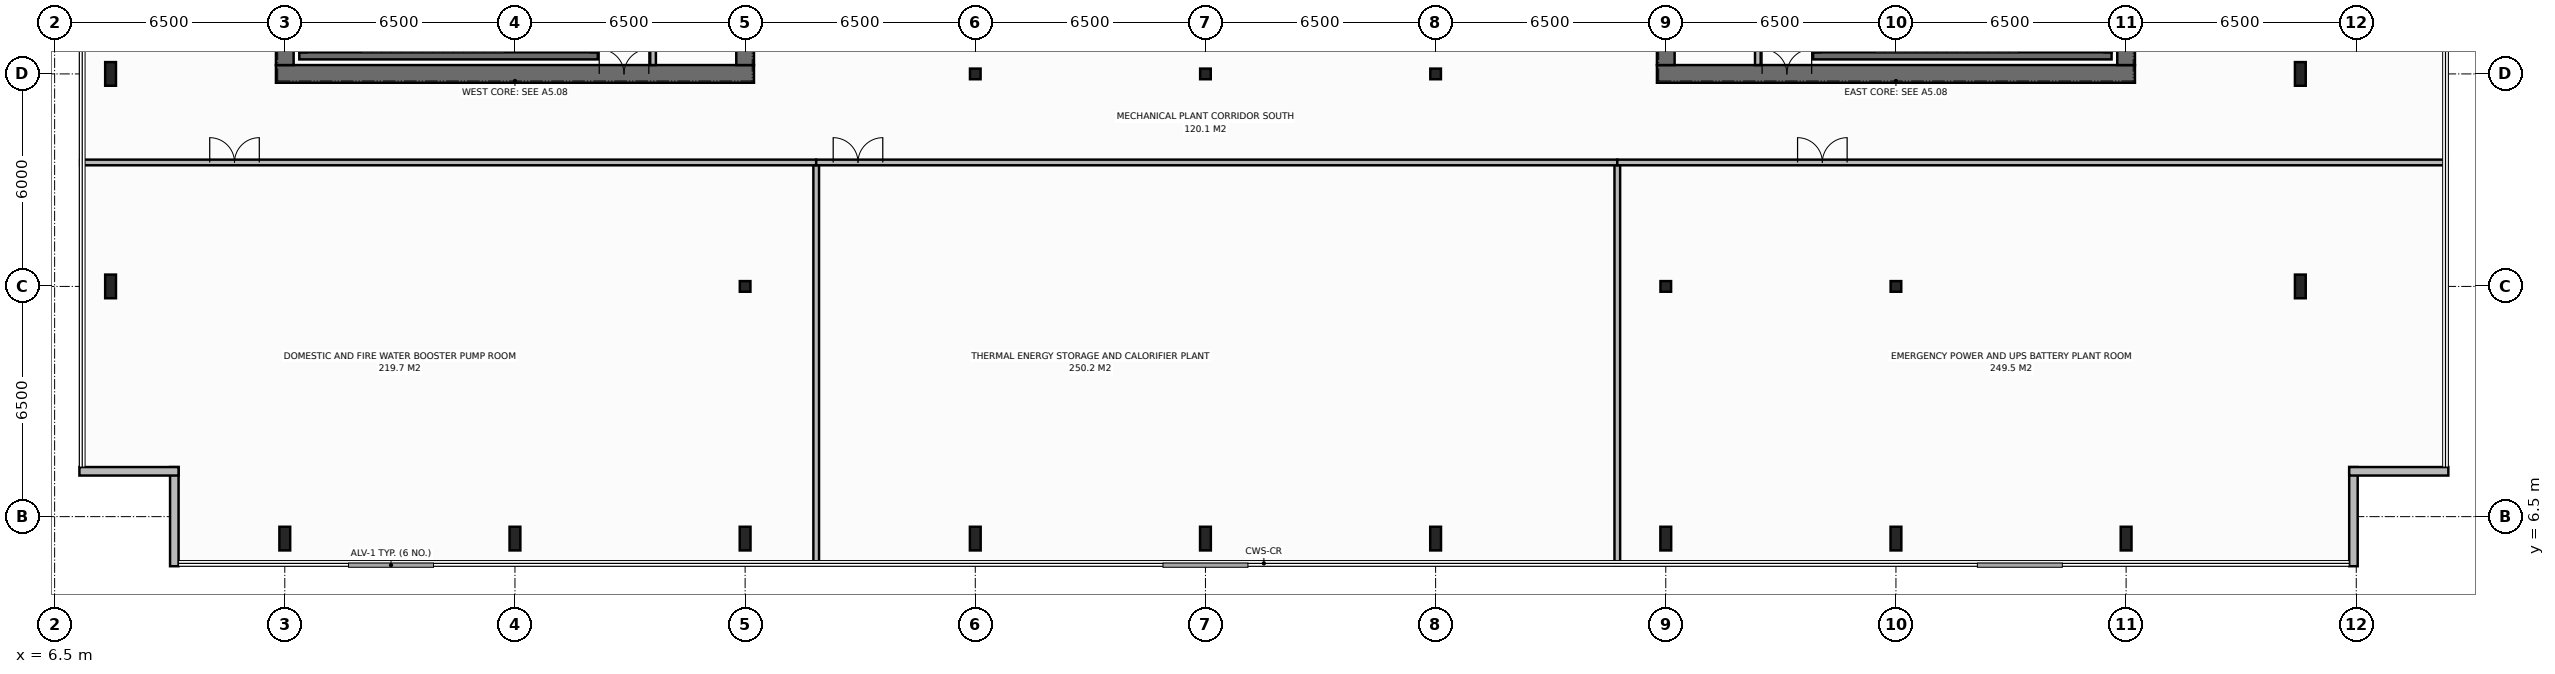
"""IFC4 building model, lengths in metres.
Left out: names, types, materials, properties, quantities, classifications, styles, units other than length and angle.
Written with IfcOpenShell. Run it as: python <this file> out.ifc"""

import sys

from ifc_helpers import new_model, si_unit, direction, frame, frame_2d, origin, origin_2d, place, context, subcontext, project, spatial, rectangle, i_section, extrude, element, fill, save


model = new_model("IFC4")
c1 = context("Model", 3, precision=1e-05, world=origin(), true_north=direction((0.0, 1.0)))
c2 = subcontext(c1, "Body", "Model", "MODEL_VIEW")
j1 = project(units=[si_unit("LENGTHUNIT", "METRE"), si_unit("PLANEANGLEUNIT", "RADIAN")], contexts=[c1])
p1 = place(None, origin())
s1 = spatial("IfcSite", under=j1, at=p1, CompositionType="ELEMENT")
p2 = place(p1, origin())
s2 = spatial("IfcBuilding", under=s1, at=p2, CompositionType="ELEMENT")
p3 = place(p2, frame((0.0, 0.0, 310.4)))
s3 = spatial("IfcBuildingStorey", under=s2, at=p3, CompositionType="ELEMENT", Elevation=310.4)
p4 = place(p3, frame((12.75, 19.0, 0.0), z_axis=(0.0, 0.0, 1.0), x_axis=(1.0, 0.0, 0.0)))
e1 = element("IfcWall", 1, at=p4, inside=s3, PredefinedType="SHEAR", context=c2, shape_type="SweptSolid", body=[
    extrude(rectangle(XDim=13.5, YDim=0.5, at=frame_2d((6.75, 0.0))), origin(), (0.0, 0.0, 1.0), 5.0),
])
p5 = place(p4, frame((9.13, 0.0, 0.0)))
e2 = element("IfcOpeningElement", 2, at=p5, cuts=e1, PredefinedType="OPENING", context=c2, shape_type="SweptSolid", body=[
    extrude(rectangle(XDim=1.4, YDim=2.2, at=frame_2d((0.7, 1.1))), frame((0.0, 0.26, 0.0), z_axis=(0.0, -1.0, 0.0), x_axis=(1.0, 0.0, 0.0)), (0.0, 0.0, 1.0), 0.52),
])
p6 = place(p3, frame((13.0, 19.25, 0.0), z_axis=(0.0, 0.0, 1.0), x_axis=(0.0, 1.0, 0.0)))
e3 = element("IfcWall", 3, at=p6, inside=s3, PredefinedType="SHEAR", context=c2, shape_type="SweptSolid", body=[
    extrude(rectangle(XDim=13.5, YDim=0.5, at=frame_2d((6.75, 0.0))), origin(), (0.0, 0.0, 1.0), 5.0),
])
p7 = place(p6, frame((4.8, 0.0, 0.0)))
e4 = element("IfcOpeningElement", 4, at=p7, cuts=e3, PredefinedType="OPENING", context=c2, shape_type="SweptSolid", body=[
    extrude(rectangle(XDim=1.4, YDim=2.2, at=frame_2d((0.7, 1.1))), frame((0.0, 0.26, 0.0), z_axis=(0.0, -1.0, 0.0), x_axis=(1.0, 0.0, 0.0)), (0.0, 0.0, 1.0), 0.52),
])
p8 = place(p3, frame((26.0, 19.25, 0.0), z_axis=(0.0, 0.0, 1.0), x_axis=(0.0, 1.0, 0.0)))
e5 = element("IfcWall", 5, at=p8, inside=s3, PredefinedType="SHEAR", context=c2, shape_type="SweptSolid", body=[
    extrude(rectangle(XDim=13.5, YDim=0.5, at=frame_2d((6.75, 0.0))), origin(), (0.0, 0.0, 1.0), 5.0),
])
p9 = place(p3, frame((51.75, 19.0, 0.0), z_axis=(0.0, 0.0, 1.0), x_axis=(1.0, 0.0, 0.0)))
e6 = element("IfcWall", 6, at=p9, inside=s3, PredefinedType="SHEAR", context=c2, shape_type="SweptSolid", body=[
    extrude(rectangle(XDim=13.5, YDim=0.5, at=frame_2d((6.75, 0.0))), origin(), (0.0, 0.0, 1.0), 5.0),
])
p10 = place(p9, frame((2.97, 0.0, 0.0)))
e7 = element("IfcOpeningElement", 7, at=p10, cuts=e6, PredefinedType="OPENING", context=c2, shape_type="SweptSolid", body=[
    extrude(rectangle(XDim=1.4, YDim=2.2, at=frame_2d((0.7, 1.1))), frame((0.0, 0.26, 0.0), z_axis=(0.0, -1.0, 0.0), x_axis=(1.0, 0.0, 0.0)), (0.0, 0.0, 1.0), 0.52),
])
p11 = place(p3, frame((52.0, 19.25, 0.0), z_axis=(0.0, 0.0, 1.0), x_axis=(0.0, 1.0, 0.0)))
e8 = element("IfcWall", 8, at=p11, inside=s3, PredefinedType="SHEAR", context=c2, shape_type="SweptSolid", body=[
    extrude(rectangle(XDim=13.5, YDim=0.5, at=frame_2d((6.75, 0.0))), origin(), (0.0, 0.0, 1.0), 5.0),
])
p12 = place(p3, frame((65.0, 19.25, 0.0), z_axis=(0.0, 0.0, 1.0), x_axis=(0.0, 1.0, 0.0)))
e9 = element("IfcWall", 9, at=p12, inside=s3, PredefinedType="SHEAR", context=c2, shape_type="SweptSolid", body=[
    extrude(rectangle(XDim=13.5, YDim=0.5, at=frame_2d((6.75, 0.0))), origin(), (0.0, 0.0, 1.0), 5.0),
])
p13 = place(p12, frame((8.2, 0.0, 0.0)))
e10 = element("IfcOpeningElement", 10, at=p13, cuts=e9, PredefinedType="OPENING", context=c2, shape_type="SweptSolid", body=[
    extrude(rectangle(XDim=1.3, YDim=2.2, at=frame_2d((0.65, 1.1))), frame((0.0, 0.26, 0.0), z_axis=(0.0, -1.0, 0.0), x_axis=(1.0, 0.0, 0.0)), (0.0, 0.0, 1.0), 0.52),
])
for number, where, z_axis, x_axis in (
    (11, (13.41, 19.51, 0.0), (0.0, 0.0, 1.0), (1.0, 0.0, 0.0)),
    (12, (56.16, 19.51, 0.0), (0.0, 0.0, 1.0), (1.0, 0.0, 0.0)),
):
    element("IfcWall", number, at=place(p3, frame(where, z_axis=z_axis, x_axis=x_axis)), inside=s3, PredefinedType="SHEAR", context=c2, shape_type="SweptSolid", body=[
        extrude(rectangle(XDim=8.43, YDim=0.2, at=frame_2d((4.215, 0.0))), origin(), (0.0, 0.0, 1.0), 5.0),
    ])
for number, where, z_axis, x_axis in (
    (13, (58.5, 13.0, 0.0), (0.0, 0.0, 1.0), (1.0, 0.0, 0.0)),
    (14, (32.5, 19.0, 0.0), (0.0, 0.0, 1.0), (1.0, 0.0, 0.0)),
    (15, (39.0, 19.0, 0.0), (0.0, 0.0, 1.0), (1.0, 0.0, 0.0)),
    (16, (45.5, 19.0, 0.0), (0.0, 0.0, 1.0), (1.0, 0.0, 0.0)),
    (17, (26.0, 13.0, 0.0), (0.0, 0.0, 1.0), (1.0, 0.0, 0.0)),
    (18, (52.0, 13.0, 0.0), (0.0, 0.0, 1.0), (1.0, 0.0, 0.0)),
):
    element("IfcColumn", number, at=place(p3, frame(where, z_axis=z_axis, x_axis=x_axis)), inside=s3, PredefinedType="COLUMN", context=c2, shape_type="SweptSolid", body=[
        extrude(i_section(OverallWidth=0.3, OverallDepth=0.3, WebThickness=0.011, FlangeThickness=0.019, at=origin_2d()), origin(), (0.0, 0.0, 1.0), 5.0),
    ])
for number, where, z_axis, x_axis in (
    (19, (13.0, 5.88, 0.0), (0.0, 0.0, 1.0), (1.0, 0.0, 0.0)),
    (20, (19.5, 5.88, 0.0), (0.0, 0.0, 1.0), (1.0, 0.0, 0.0)),
    (21, (26.0, 5.88, 0.0), (0.0, 0.0, 1.0), (1.0, 0.0, 0.0)),
    (22, (32.5, 5.88, 0.0), (0.0, 0.0, 1.0), (1.0, 0.0, 0.0)),
    (23, (39.0, 5.88, 0.0), (0.0, 0.0, 1.0), (1.0, 0.0, 0.0)),
    (24, (45.5, 5.88, 0.0), (0.0, 0.0, 1.0), (1.0, 0.0, 0.0)),
    (25, (52.0, 5.88, 0.0), (0.0, 0.0, 1.0), (1.0, 0.0, 0.0)),
    (26, (58.5, 5.88, 0.0), (0.0, 0.0, 1.0), (1.0, 0.0, 0.0)),
    (27, (65.0, 5.88, 0.0), (0.0, 0.0, 1.0), (1.0, 0.0, 0.0)),
    (28, (8.08, 13.0, 0.0), (0.0, 0.0, 1.0), (1.0, 0.0, 0.0)),
    (29, (69.92, 13.0, 0.0), (0.0, 0.0, 1.0), (1.0, 0.0, 0.0)),
    (30, (8.08, 19.0, 0.0), (0.0, 0.0, 1.0), (1.0, 0.0, 0.0)),
    (31, (69.92, 19.0, 0.0), (0.0, 0.0, 1.0), (1.0, 0.0, 0.0)),
):
    element("IfcColumn", number, at=place(p3, frame(where, z_axis=z_axis, x_axis=x_axis)), inside=s3, PredefinedType="COLUMN", context=c2, shape_type="SweptSolid", body=[
        extrude(i_section(OverallWidth=0.305, OverallDepth=0.668, WebThickness=0.021, FlangeThickness=0.04, at=origin_2d()), origin(), (0.0, 0.0, 1.0), 5.0),
    ])
p14 = place(p3, frame((9.88, 5.1, 0.0), z_axis=(0.0, 0.0, 1.0), x_axis=(0.0, 1.0, 0.0)))
e32 = element("IfcWall", 32, at=p14, inside=s3, PredefinedType="STANDARD", context=c2, shape_type="SweptSolid", body=[
    extrude(rectangle(XDim=2.8, YDim=0.24, at=frame_2d((1.4, 0.0))), origin(), (0.0, 0.0, 1.0), 4.72),
])
p15 = place(p3, frame((10.0, 7.78, 0.0), z_axis=(0.0, 0.0, 1.0), x_axis=(-1.0, 0.0, 0.0)))
e33 = element("IfcWall", 33, at=p15, inside=s3, PredefinedType="STANDARD", context=c2, shape_type="SweptSolid", body=[
    extrude(rectangle(XDim=2.8, YDim=0.24, at=frame_2d((1.4, 0.0))), origin(), (0.0, 0.0, 1.0), 4.72),
])
p16 = place(p3, frame((71.42, 7.9, 0.0), z_axis=(0.0, 0.0, 1.0), x_axis=(0.0, -1.0, 0.0)))
e34 = element("IfcWall", 34, at=p16, inside=s3, PredefinedType="STANDARD", context=c2, shape_type="SweptSolid", body=[
    extrude(rectangle(XDim=2.8, YDim=0.24, at=frame_2d((1.4, 0.0))), origin(), (0.0, 0.0, 1.0), 4.72),
])
p17 = place(p3, frame((74.1, 7.78, 0.0), z_axis=(0.0, 0.0, 1.0), x_axis=(-1.0, 0.0, 0.0)))
e35 = element("IfcWall", 35, at=p17, inside=s3, PredefinedType="STANDARD", context=c2, shape_type="SweptSolid", body=[
    extrude(rectangle(XDim=2.8, YDim=0.24, at=frame_2d((1.4, 0.0))), origin(), (0.0, 0.0, 1.0), 4.72),
])
p18 = place(p3, frame((23.4, 19.25, 0.0), z_axis=(0.0, 0.0, 1.0), x_axis=(0.0, 1.0, 0.0)))
e36 = element("IfcWall", 36, at=p18, inside=s3, PredefinedType="STANDARD", context=c2, shape_type="SweptSolid", body=[
    extrude(rectangle(XDim=13.5, YDim=0.16, at=frame_2d((6.75, 0.0))), origin(), (0.0, 0.0, 1.0), 4.72),
])
p19 = place(p18, frame((2.25, 0.0, 0.0)))
e37 = element("IfcOpeningElement", 37, at=p19, cuts=e36, PredefinedType="OPENING", context=c2, shape_type="SweptSolid", body=[
    extrude(rectangle(XDim=0.95, YDim=2.15, at=frame_2d((0.475, 1.075))), frame((0.0, 0.09, 0.0), z_axis=(0.0, -1.0, 0.0), x_axis=(1.0, 0.0, 0.0)), (0.0, 0.0, 1.0), 0.18),
])
p20 = place(p18, frame((6.35, 0.0, 0.0)))
e38 = element("IfcOpeningElement", 38, at=p20, cuts=e36, PredefinedType="OPENING", context=c2, shape_type="SweptSolid", body=[
    extrude(rectangle(XDim=0.95, YDim=2.15, at=frame_2d((0.475, 1.075))), frame((0.0, 0.09, 0.0), z_axis=(0.0, -1.0, 0.0), x_axis=(1.0, 0.0, 0.0)), (0.0, 0.0, 1.0), 0.18),
])
p21 = place(p18, frame((9.95, 0.0, 0.0)))
e39 = element("IfcOpeningElement", 39, at=p21, cuts=e36, PredefinedType="OPENING", context=c2, shape_type="SweptSolid", body=[
    extrude(rectangle(XDim=0.95, YDim=2.15, at=frame_2d((0.475, 1.075))), frame((0.0, 0.09, 0.0), z_axis=(0.0, -1.0, 0.0), x_axis=(1.0, 0.0, 0.0)), (0.0, 0.0, 1.0), 0.18),
])
p22 = place(p3, frame((54.6, 19.25, 0.0), z_axis=(0.0, 0.0, 1.0), x_axis=(0.0, 1.0, 0.0)))
e40 = element("IfcWall", 40, at=p22, inside=s3, PredefinedType="STANDARD", context=c2, shape_type="SweptSolid", body=[
    extrude(rectangle(XDim=13.5, YDim=0.16, at=frame_2d((6.75, 0.0))), origin(), (0.0, 0.0, 1.0), 4.72),
])
p23 = place(p22, frame((2.15, 0.0, 0.0)))
e41 = element("IfcOpeningElement", 41, at=p23, cuts=e40, PredefinedType="OPENING", context=c2, shape_type="SweptSolid", body=[
    extrude(rectangle(XDim=0.95, YDim=2.15, at=frame_2d((0.475, 1.075))), frame((0.0, 0.09, 0.0), z_axis=(0.0, -1.0, 0.0), x_axis=(1.0, 0.0, 0.0)), (0.0, 0.0, 1.0), 0.18),
])
p24 = place(p22, frame((6.25, 0.0, 0.0)))
e42 = element("IfcOpeningElement", 42, at=p24, cuts=e40, PredefinedType="OPENING", context=c2, shape_type="SweptSolid", body=[
    extrude(rectangle(XDim=0.95, YDim=2.15, at=frame_2d((0.475, 1.075))), frame((0.0, 0.09, 0.0), z_axis=(0.0, -1.0, 0.0), x_axis=(1.0, 0.0, 0.0)), (0.0, 0.0, 1.0), 0.18),
])
p25 = place(p22, frame((9.95, 0.0, 0.0)))
e43 = element("IfcOpeningElement", 43, at=p25, cuts=e40, PredefinedType="OPENING", context=c2, shape_type="SweptSolid", body=[
    extrude(rectangle(XDim=0.95, YDim=2.15, at=frame_2d((0.475, 1.075))), frame((0.0, 0.09, 0.0), z_axis=(0.0, -1.0, 0.0), x_axis=(1.0, 0.0, 0.0)), (0.0, 0.0, 1.0), 0.18),
])
p26 = place(p3, frame((28.007, 5.12, 0.0), z_axis=(0.0, 0.0, 1.0), x_axis=(0.0, 1.0, 0.0)))
e44 = element("IfcWall", 44, at=p26, inside=s3, PredefinedType="STANDARD", context=c2, shape_type="SweptSolid", body=[
    extrude(rectangle(XDim=11.38, YDim=0.16, at=frame_2d((5.69, 0.0))), origin(), (0.0, 0.0, 1.0), 4.72),
])
p27 = place(p3, frame((7.22, 16.5, 0.0), z_axis=(0.0, 0.0, 1.0), x_axis=(1.0, 0.0, 0.0)))
e45 = element("IfcWall", 45, at=p27, inside=s3, PredefinedType="STANDARD", context=c2, shape_type="SweptSolid", body=[
    extrude(rectangle(XDim=20.787, YDim=0.16, at=frame_2d((10.394, 0.0))), origin(), (0.0, 0.0, 1.0), 4.72),
])
p28 = place(p27, frame((3.66, 0.0, 0.0)))
e46 = element("IfcOpeningElement", 46, at=p28, cuts=e45, PredefinedType="OPENING", context=c2, shape_type="SweptSolid", body=[
    extrude(rectangle(XDim=1.4, YDim=2.2, at=frame_2d((0.7, 1.1))), frame((0.0, 0.09, 0.0), z_axis=(0.0, -1.0, 0.0), x_axis=(1.0, 0.0, 0.0)), (0.0, 0.0, 1.0), 0.18),
])
p29 = place(p3, frame((50.631, 5.12, 0.0), z_axis=(0.0, 0.0, 1.0), x_axis=(0.0, 1.0, 0.0)))
e47 = element("IfcWall", 47, at=p29, inside=s3, PredefinedType="STANDARD", context=c2, shape_type="SweptSolid", body=[
    extrude(rectangle(XDim=11.38, YDim=0.16, at=frame_2d((5.69, 0.0))), origin(), (0.0, 0.0, 1.0), 4.72),
])
p30 = place(p3, frame((28.007, 16.5, 0.0), z_axis=(0.0, 0.0, 1.0), x_axis=(1.0, 0.0, 0.0)))
e48 = element("IfcWall", 48, at=p30, inside=s3, PredefinedType="STANDARD", context=c2, shape_type="SweptSolid", body=[
    extrude(rectangle(XDim=22.624, YDim=0.16, at=frame_2d((11.312, 0.0))), origin(), (0.0, 0.0, 1.0), 4.72),
])
p31 = place(p30, frame((0.48, 0.0, 0.0)))
e49 = element("IfcOpeningElement", 49, at=p31, cuts=e48, PredefinedType="OPENING", context=c2, shape_type="SweptSolid", body=[
    extrude(rectangle(XDim=1.4, YDim=2.2, at=frame_2d((0.7, 1.1))), frame((0.0, 0.09, 0.0), z_axis=(0.0, -1.0, 0.0), x_axis=(1.0, 0.0, 0.0)), (0.0, 0.0, 1.0), 0.18),
])
p32 = place(p3, frame((50.631, 16.5, 0.0), z_axis=(0.0, 0.0, 1.0), x_axis=(1.0, 0.0, 0.0)))
e50 = element("IfcWall", 50, at=p32, inside=s3, PredefinedType="STANDARD", context=c2, shape_type="SweptSolid", body=[
    extrude(rectangle(XDim=23.449, YDim=0.16, at=frame_2d((11.725, 0.0))), origin(), (0.0, 0.0, 1.0), 4.72),
])
p33 = place(p32, frame((5.091, 0.0, 0.0)))
e51 = element("IfcOpeningElement", 51, at=p33, cuts=e50, PredefinedType="OPENING", context=c2, shape_type="SweptSolid", body=[
    extrude(rectangle(XDim=1.4, YDim=2.2, at=frame_2d((0.7, 1.1))), frame((0.0, 0.09, 0.0), z_axis=(0.0, -1.0, 0.0), x_axis=(1.0, 0.0, 0.0)), (0.0, 0.0, 1.0), 0.18),
])
p34 = place(p5, origin())
e52 = element("IfcDoor", 52, at=p34, inside=s3, OperationType="DOUBLE_DOOR_SINGLE_SWING", PredefinedType="DOOR", context=c2, shape_type="SweptSolid", body=[
    extrude(rectangle(XDim=1.4, YDim=2.2, at=frame_2d((0.7, 1.1))), frame((0.0, 0.075, 0.0), z_axis=(0.0, -1.0, 0.0), x_axis=(1.0, 0.0, 0.0)), (0.0, 0.0, 1.0), 0.05),
])
fill(e2, e52)
p35 = place(p10, origin())
e53 = element("IfcDoor", 53, at=p35, inside=s3, OperationType="DOUBLE_DOOR_SINGLE_SWING", PredefinedType="DOOR", context=c2, shape_type="SweptSolid", body=[
    extrude(rectangle(XDim=1.4, YDim=2.2, at=frame_2d((0.7, 1.1))), frame((0.0, 0.075, 0.0), z_axis=(0.0, -1.0, 0.0), x_axis=(1.0, 0.0, 0.0)), (0.0, 0.0, 1.0), 0.05),
])
fill(e7, e53)
p36 = place(p28, origin())
e54 = element("IfcDoor", 54, at=p36, inside=s3, OperationType="DOUBLE_DOOR_SINGLE_SWING", PredefinedType="DOOR", context=c2, shape_type="SweptSolid", body=[
    extrude(rectangle(XDim=1.4, YDim=2.2, at=frame_2d((0.7, 1.1))), frame((0.0, 0.025, 0.0), z_axis=(0.0, -1.0, 0.0), x_axis=(1.0, 0.0, 0.0)), (0.0, 0.0, 1.0), 0.05),
])
fill(e46, e54)
p37 = place(p31, origin())
e55 = element("IfcDoor", 55, at=p37, inside=s3, OperationType="DOUBLE_DOOR_SINGLE_SWING", PredefinedType="DOOR", context=c2, shape_type="SweptSolid", body=[
    extrude(rectangle(XDim=1.4, YDim=2.2, at=frame_2d((0.7, 1.1))), frame((0.0, 0.025, 0.0), z_axis=(0.0, -1.0, 0.0), x_axis=(1.0, 0.0, 0.0)), (0.0, 0.0, 1.0), 0.05),
])
fill(e49, e55)
p38 = place(p33, origin())
e56 = element("IfcDoor", 56, at=p38, inside=s3, OperationType="DOUBLE_DOOR_SINGLE_SWING", PredefinedType="DOOR", context=c2, shape_type="SweptSolid", body=[
    extrude(rectangle(XDim=1.4, YDim=2.2, at=frame_2d((0.7, 1.1))), frame((0.0, 0.025, 0.0), z_axis=(0.0, -1.0, 0.0), x_axis=(1.0, 0.0, 0.0)), (0.0, 0.0, 1.0), 0.05),
])
fill(e51, e56)
save(model, sys.argv[1])
